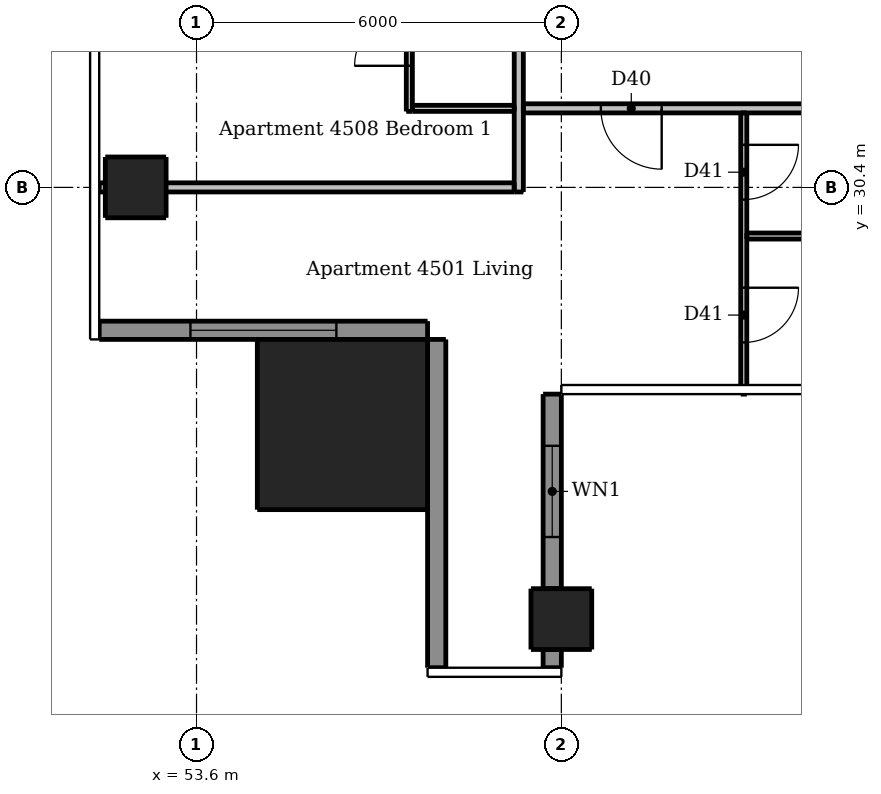
"""IFC4 building model, lengths in metres.
Left out: names, types, materials, properties, quantities, classifications, styles, units other than length and angle.
Written with IfcOpenShell. Run it as: python <this file> out.ifc"""

import sys

from ifc_helpers import new_model, si_unit, direction, frame, frame_2d, origin, origin_2d, place, context, subcontext, project, spatial, rectangle, extrude, element, fill, save


model = new_model("IFC4")
c1 = context("Model", 3, precision=1e-05, world=origin(), true_north=direction((0.0, 1.0)))
c2 = subcontext(c1, "Body", "Model", "MODEL_VIEW")
j1 = project(units=[si_unit("LENGTHUNIT", "METRE"), si_unit("PLANEANGLEUNIT", "RADIAN")], contexts=[c1])
p1 = place(None, origin())
s1 = spatial("IfcSite", under=j1, at=p1, CompositionType="ELEMENT")
p2 = place(p1, origin())
s2 = spatial("IfcBuilding", under=s1, at=p2, CompositionType="ELEMENT")
p3 = place(p2, frame((0.0, 0.0, 168.1)))
s3 = spatial("IfcBuildingStorey", under=s2, at=p3, CompositionType="ELEMENT", Elevation=168.1)
for number, where, z_axis, x_axis in (
    (1, (59.6, 23.3, 0.0), (0.0, 0.0, 1.0), (1.0, 0.0, 0.0)),
    (2, (52.6, 30.4, 0.0), (0.0, 0.0, 1.0), (1.0, 0.0, 0.0)),
):
    element("IfcColumn", number, at=place(p3, frame(where, z_axis=z_axis, x_axis=x_axis)), inside=s3, PredefinedType="COLUMN", context=c2, shape_type="SweptSolid", body=[
        extrude(rectangle(XDim=1.0, YDim=1.0, at=origin_2d()), origin(), (0.0, 0.0, 1.0), 3.05),
    ])
p4 = place(p3, frame((56.0, 26.5, 0.0), z_axis=(0.0, 0.0, 1.0), x_axis=(1.0, 0.0, 0.0)))
e3 = element("IfcColumn", 3, at=p4, inside=s3, PredefinedType="COLUMN", context=c2, shape_type="SweptSolid", body=[
    extrude(rectangle(XDim=2.8, YDim=2.8, at=origin_2d()), origin(), (0.0, 0.0, 1.0), 3.3),
])
p5 = place(p3, frame((59.45, 22.5, 0.0), z_axis=(0.0, 0.0, 1.0), x_axis=(0.0, 1.0, 0.0)))
e4 = element("IfcWall", 4, at=p5, inside=s3, PredefinedType="SOLIDWALL", context=c2, shape_type="SweptSolid", body=[
    extrude(rectangle(XDim=0.3, YDim=0.3, at=frame_2d((0.15, 0.0))), origin(), (0.0, 0.0, 1.0), 3.05),
])
p6 = place(p3, frame((59.45, 23.8, 0.0), z_axis=(0.0, 0.0, 1.0), x_axis=(0.0, 1.0, 0.0)))
e5 = element("IfcWall", 5, at=p6, inside=s3, PredefinedType="SOLIDWALL", context=c2, shape_type="SweptSolid", body=[
    extrude(rectangle(XDim=3.2, YDim=0.3, at=frame_2d((1.6, 0.0))), origin(), (0.0, 0.0, 1.0), 3.05),
])
p7 = place(p6, frame((0.85, 0.0, 0.9)))
e6 = element("IfcOpeningElement", 6, at=p7, cuts=e5, PredefinedType="OPENING", context=c2, shape_type="SweptSolid", body=[
    extrude(rectangle(XDim=1.5, YDim=1.5, at=frame_2d((0.75, 0.75))), frame((0.0, 0.16, 0.0), z_axis=(0.0, -1.0, 0.0), x_axis=(1.0, 0.0, 0.0)), (0.0, 0.0, 1.0), 0.32),
])
p8 = place(p3, frame((52.0, 28.05, 0.0), z_axis=(0.0, 0.0, 1.0), x_axis=(1.0, 0.0, 0.0)))
e7 = element("IfcWall", 7, at=p8, inside=s3, PredefinedType="SOLIDWALL", context=c2, shape_type="SweptSolid", body=[
    extrude(rectangle(XDim=5.4, YDim=0.3, at=frame_2d((2.7, 0.0))), origin(), (0.0, 0.0, 1.0), 3.05),
])
p9 = place(p8, frame((1.5, 0.0, 0.15)))
e8 = element("IfcOpeningElement", 8, at=p9, cuts=e7, PredefinedType="OPENING", context=c2, shape_type="SweptSolid", body=[
    extrude(rectangle(XDim=2.4, YDim=2.1, at=frame_2d((1.2, 1.05))), frame((0.0, 0.16, 0.0), z_axis=(0.0, -1.0, 0.0), x_axis=(1.0, 0.0, 0.0)), (0.0, 0.0, 1.0), 0.32),
])
p10 = place(p3, frame((57.55, 27.9, 0.0), z_axis=(0.0, 0.0, 1.0), x_axis=(0.0, -1.0, 0.0)))
e9 = element("IfcWall", 9, at=p10, inside=s3, PredefinedType="SOLIDWALL", context=c2, shape_type="SweptSolid", body=[
    extrude(rectangle(XDim=5.4, YDim=0.3, at=frame_2d((2.7, 0.0))), origin(), (0.0, 0.0, 1.0), 3.05),
])
p11 = place(p3, frame((57.1, 31.65, 0.0), z_axis=(0.0, 0.0, 1.0), x_axis=(0.0, 1.0, 0.0)))
e10 = element("IfcWall", 10, at=p11, inside=s3, PredefinedType="PARTITIONING", context=c2, shape_type="SweptSolid", body=[
    extrude(rectangle(XDim=16.675, YDim=0.1, at=frame_2d((8.337, 0.0))), origin(), (0.0, 0.0, 1.0), 3.05),
])
p12 = place(p11, frame((9.7, 0.0, 0.0)))
e11 = element("IfcOpeningElement", 11, at=p12, cuts=e10, PredefinedType="OPENING", context=c2, shape_type="SweptSolid", body=[
    extrude(rectangle(XDim=0.9, YDim=2.1, at=frame_2d((0.45, 1.05))), frame((0.0, 0.06, 0.0), z_axis=(0.0, -1.0, 0.0), x_axis=(1.0, 0.0, 0.0)), (0.0, 0.0, 1.0), 0.12),
])
p13 = place(p11, frame((14.8, 0.0, 0.0)))
e12 = element("IfcOpeningElement", 12, at=p13, cuts=e10, PredefinedType="OPENING", context=c2, shape_type="SweptSolid", body=[
    extrude(rectangle(XDim=0.9, YDim=2.1, at=frame_2d((0.45, 1.05))), frame((0.0, 0.06, 0.0), z_axis=(0.0, -1.0, 0.0), x_axis=(1.0, 0.0, 0.0)), (0.0, 0.0, 1.0), 0.12),
])
p14 = place(p11, frame((12.4, 0.0, 0.0)))
e13 = element("IfcOpeningElement", 13, at=p14, cuts=e10, PredefinedType="OPENING", context=c2, shape_type="SweptSolid", body=[
    extrude(rectangle(XDim=0.9, YDim=2.1, at=frame_2d((0.45, 1.05))), frame((0.0, 0.06, 0.0), z_axis=(0.0, -1.0, 0.0), x_axis=(1.0, 0.0, 0.0)), (0.0, 0.0, 1.0), 0.12),
])
p15 = place(p11, frame((5.2, 0.0, 0.0)))
e14 = element("IfcOpeningElement", 14, at=p15, cuts=e10, PredefinedType="OPENING", context=c2, shape_type="SweptSolid", body=[
    extrude(rectangle(XDim=0.9, YDim=2.1, at=frame_2d((0.45, 1.05))), frame((0.0, 0.06, 0.0), z_axis=(0.0, -1.0, 0.0), x_axis=(1.0, 0.0, 0.0)), (0.0, 0.0, 1.0), 0.12),
])
p16 = place(p11, frame((7.05, 0.0, 0.0)))
e15 = element("IfcOpeningElement", 15, at=p16, cuts=e10, PredefinedType="OPENING", context=c2, shape_type="SweptSolid", body=[
    extrude(rectangle(XDim=0.8, YDim=2.1, at=frame_2d((0.4, 1.05))), frame((0.0, 0.06, 0.0), z_axis=(0.0, -1.0, 0.0), x_axis=(1.0, 0.0, 0.0)), (0.0, 0.0, 1.0), 0.12),
])
p17 = place(p11, frame((0.75, 0.0, 0.0)))
e16 = element("IfcOpeningElement", 16, at=p17, cuts=e10, PredefinedType="OPENING", context=c2, shape_type="SweptSolid", body=[
    extrude(rectangle(XDim=0.9, YDim=2.1, at=frame_2d((0.45, 1.05))), frame((0.0, 0.06, 0.0), z_axis=(0.0, -1.0, 0.0), x_axis=(1.0, 0.0, 0.0)), (0.0, 0.0, 1.0), 0.12),
])
p18 = place(p11, frame((3.15, 0.0, 0.0)))
e17 = element("IfcOpeningElement", 17, at=p18, cuts=e10, PredefinedType="OPENING", context=c2, shape_type="SweptSolid", body=[
    extrude(rectangle(XDim=0.8, YDim=2.1, at=frame_2d((0.4, 1.05))), frame((0.0, 0.06, 0.0), z_axis=(0.0, -1.0, 0.0), x_axis=(1.0, 0.0, 0.0)), (0.0, 0.0, 1.0), 0.12),
])
p19 = place(p3, frame((62.6, 31.625, 0.0), z_axis=(0.0, 0.0, 1.0), x_axis=(0.0, -1.0, 0.0)))
e18 = element("IfcWall", 18, at=p19, inside=s3, PredefinedType="PARTITIONING", context=c2, shape_type="SweptSolid", body=[
    extrude(rectangle(XDim=4.625, YDim=0.1, at=frame_2d((2.312, 0.0))), origin(), (0.0, 0.0, 1.0), 3.05),
])
p20 = place(p19, frame((0.525, 0.0, 0.0)))
e19 = element("IfcOpeningElement", 19, at=p20, cuts=e18, PredefinedType="OPENING", context=c2, shape_type="SweptSolid", body=[
    extrude(rectangle(XDim=0.9, YDim=2.1, at=frame_2d((0.45, 1.05))), frame((0.0, 0.06, 0.0), z_axis=(0.0, -1.0, 0.0), x_axis=(1.0, 0.0, 0.0)), (0.0, 0.0, 1.0), 0.12),
])
p21 = place(p19, frame((2.875, 0.0, 0.0)))
e20 = element("IfcOpeningElement", 20, at=p21, cuts=e18, PredefinedType="OPENING", context=c2, shape_type="SweptSolid", body=[
    extrude(rectangle(XDim=0.9, YDim=2.1, at=frame_2d((0.45, 1.05))), frame((0.0, 0.06, 0.0), z_axis=(0.0, -1.0, 0.0), x_axis=(1.0, 0.0, 0.0)), (0.0, 0.0, 1.0), 0.12),
])
p22 = place(p3, frame((57.15, 31.7, 0.0), z_axis=(0.0, 0.0, 1.0), x_axis=(1.0, 0.0, 0.0)))
e21 = element("IfcWall", 21, at=p22, inside=s3, PredefinedType="PARTITIONING", context=c2, shape_type="SweptSolid", body=[
    extrude(rectangle(XDim=1.675, YDim=0.1, at=frame_2d((0.837, 0.0))), origin(), (0.0, 0.0, 1.0), 3.05),
])
p23 = place(p3, frame((62.65, 29.6, 0.0), z_axis=(0.0, 0.0, 1.0), x_axis=(1.0, 0.0, 0.0)))
e22 = element("IfcWall", 22, at=p23, inside=s3, PredefinedType="PARTITIONING", context=c2, shape_type="SweptSolid", body=[
    extrude(rectangle(XDim=5.875, YDim=0.1, at=frame_2d((2.938, 0.0))), origin(), (0.0, 0.0, 1.0), 3.05),
])
p24 = place(p23, frame((3.75, 0.0, 0.0)))
e23 = element("IfcOpeningElement", 23, at=p24, cuts=e22, PredefinedType="OPENING", context=c2, shape_type="SweptSolid", body=[
    extrude(rectangle(XDim=0.8, YDim=2.1, at=frame_2d((0.4, 1.05))), frame((0.0, 0.06, 0.0), z_axis=(0.0, -1.0, 0.0), x_axis=(1.0, 0.0, 0.0)), (0.0, 0.0, 1.0), 0.12),
])
p25 = place(p3, frame((58.9, 30.325, 0.0), z_axis=(0.0, 0.0, 1.0), x_axis=(0.0, 1.0, 0.0)))
e24 = element("IfcWall", 24, at=p25, inside=s3, PredefinedType="PARTITIONING", context=c2, shape_type="SweptSolid", body=[
    extrude(rectangle(XDim=30.85, YDim=0.15, at=frame_2d((15.425, 0.0))), origin(), (0.0, 0.0, 1.0), 3.05),
])
p26 = place(p25, frame((9.225, 0.0, 0.0)))
e25 = element("IfcOpeningElement", 25, at=p26, cuts=e24, PredefinedType="OPENING", context=c2, shape_type="SweptSolid", body=[
    extrude(rectangle(XDim=1.0, YDim=2.1, at=frame_2d((0.5, 1.05))), frame((0.0, 0.085, 0.0), z_axis=(0.0, -1.0, 0.0), x_axis=(1.0, 0.0, 0.0)), (0.0, 0.0, 1.0), 0.17),
])
p27 = place(p25, frame((26.925, 0.0, 0.0)))
e26 = element("IfcOpeningElement", 26, at=p27, cuts=e24, PredefinedType="OPENING", context=c2, shape_type="SweptSolid", body=[
    extrude(rectangle(XDim=1.0, YDim=2.1, at=frame_2d((0.5, 1.05))), frame((0.0, 0.085, 0.0), z_axis=(0.0, -1.0, 0.0), x_axis=(1.0, 0.0, 0.0)), (0.0, 0.0, 1.0), 0.17),
])
p28 = place(p3, frame((89.525, 31.7, 0.0), z_axis=(0.0, 0.0, 1.0), x_axis=(-1.0, 0.0, 0.0)))
e27 = element("IfcWall", 27, at=p28, inside=s3, PredefinedType="PARTITIONING", context=c2, shape_type="SweptSolid", body=[
    extrude(rectangle(XDim=30.55, YDim=0.15, at=frame_2d((15.275, 0.0))), origin(), (0.0, 0.0, 1.0), 3.05),
])
p29 = place(p28, frame((28.275, 0.0, 0.0)))
e28 = element("IfcOpeningElement", 28, at=p29, cuts=e27, PredefinedType="OPENING", context=c2, shape_type="SweptSolid", body=[
    extrude(rectangle(XDim=1.0, YDim=2.1, at=frame_2d((0.5, 1.05))), frame((0.0, 0.085, 0.0), z_axis=(0.0, -1.0, 0.0), x_axis=(1.0, 0.0, 0.0)), (0.0, 0.0, 1.0), 0.17),
])
p30 = place(p28, frame((9.925, 0.0, 0.0)))
e29 = element("IfcOpeningElement", 29, at=p30, cuts=e27, PredefinedType="OPENING", context=c2, shape_type="SweptSolid", body=[
    extrude(rectangle(XDim=1.0, YDim=2.1, at=frame_2d((0.5, 1.05))), frame((0.0, 0.085, 0.0), z_axis=(0.0, -1.0, 0.0), x_axis=(1.0, 0.0, 0.0)), (0.0, 0.0, 1.0), 0.17),
])
p31 = place(p3, frame((52.0, 30.4, 0.0), z_axis=(0.0, 0.0, 1.0), x_axis=(1.0, 0.0, 0.0)))
e30 = element("IfcWall", 30, at=p31, inside=s3, PredefinedType="PARTITIONING", context=c2, shape_type="SweptSolid", body=[
    extrude(rectangle(XDim=6.825, YDim=0.15, at=frame_2d((3.413, 0.0))), origin(), (0.0, 0.0, 1.0), 2.647),
])
p32 = place(p7, origin())
e31 = element("IfcWindow", 31, at=p32, inside=s3, PartitioningType="DOUBLE_PANEL_VERTICAL", PredefinedType="WINDOW", context=c2, shape_type="SweptSolid", body=[
    extrude(rectangle(XDim=1.5, YDim=1.5, at=frame_2d((0.75, 0.75))), frame((0.0, 0.03, 0.0), z_axis=(0.0, -1.0, 0.0), x_axis=(1.0, 0.0, 0.0)), (0.0, 0.0, 1.0), 0.06),
])
fill(e6, e31)
p33 = place(p9, origin())
e32 = element("IfcWindow", 32, at=p33, inside=s3, PartitioningType="DOUBLE_PANEL_VERTICAL", PredefinedType="WINDOW", context=c2, shape_type="SweptSolid", body=[
    extrude(rectangle(XDim=2.4, YDim=2.1, at=frame_2d((1.2, 1.05))), frame((0.0, 0.03, 0.0), z_axis=(0.0, -1.0, 0.0), x_axis=(1.0, 0.0, 0.0)), (0.0, 0.0, 1.0), 0.06),
])
fill(e8, e32)
p34 = place(p29, origin())
e33 = element("IfcDoor", 33, at=p34, inside=s3, OperationType="SINGLE_SWING_LEFT", PredefinedType="DOOR", context=c2, shape_type="SweptSolid", body=[
    extrude(rectangle(XDim=1.0, YDim=2.1, at=frame_2d((0.5, 1.05))), frame((0.0, 0.025, 0.0), z_axis=(0.0, -1.0, 0.0), x_axis=(1.0, 0.0, 0.0)), (0.0, 0.0, 1.0), 0.05),
])
fill(e28, e33)
p35 = place(p20, origin())
e34 = element("IfcDoor", 34, at=p35, inside=s3, OperationType="SINGLE_SWING_LEFT", PredefinedType="DOOR", context=c2, shape_type="SweptSolid", body=[
    extrude(rectangle(XDim=0.9, YDim=2.1, at=frame_2d((0.45, 1.05))), frame((0.0, 0.025, 0.0), z_axis=(0.0, -1.0, 0.0), x_axis=(1.0, 0.0, 0.0)), (0.0, 0.0, 1.0), 0.05),
])
fill(e19, e34)
p36 = place(p21, origin())
e35 = element("IfcDoor", 35, at=p36, inside=s3, OperationType="SINGLE_SWING_LEFT", PredefinedType="DOOR", context=c2, shape_type="SweptSolid", body=[
    extrude(rectangle(XDim=0.9, YDim=2.1, at=frame_2d((0.45, 1.05))), frame((0.0, 0.025, 0.0), z_axis=(0.0, -1.0, 0.0), x_axis=(1.0, 0.0, 0.0)), (0.0, 0.0, 1.0), 0.05),
])
fill(e20, e35)
p37 = place(p17, origin())
e36 = element("IfcDoor", 36, at=p37, inside=s3, OperationType="SINGLE_SWING_LEFT", PredefinedType="DOOR", context=c2, shape_type="SweptSolid", body=[
    extrude(rectangle(XDim=0.9, YDim=2.1, at=frame_2d((0.45, 1.05))), frame((0.0, 0.025, 0.0), z_axis=(0.0, -1.0, 0.0), x_axis=(1.0, 0.0, 0.0)), (0.0, 0.0, 1.0), 0.05),
])
fill(e16, e36)
save(model, sys.argv[1])
